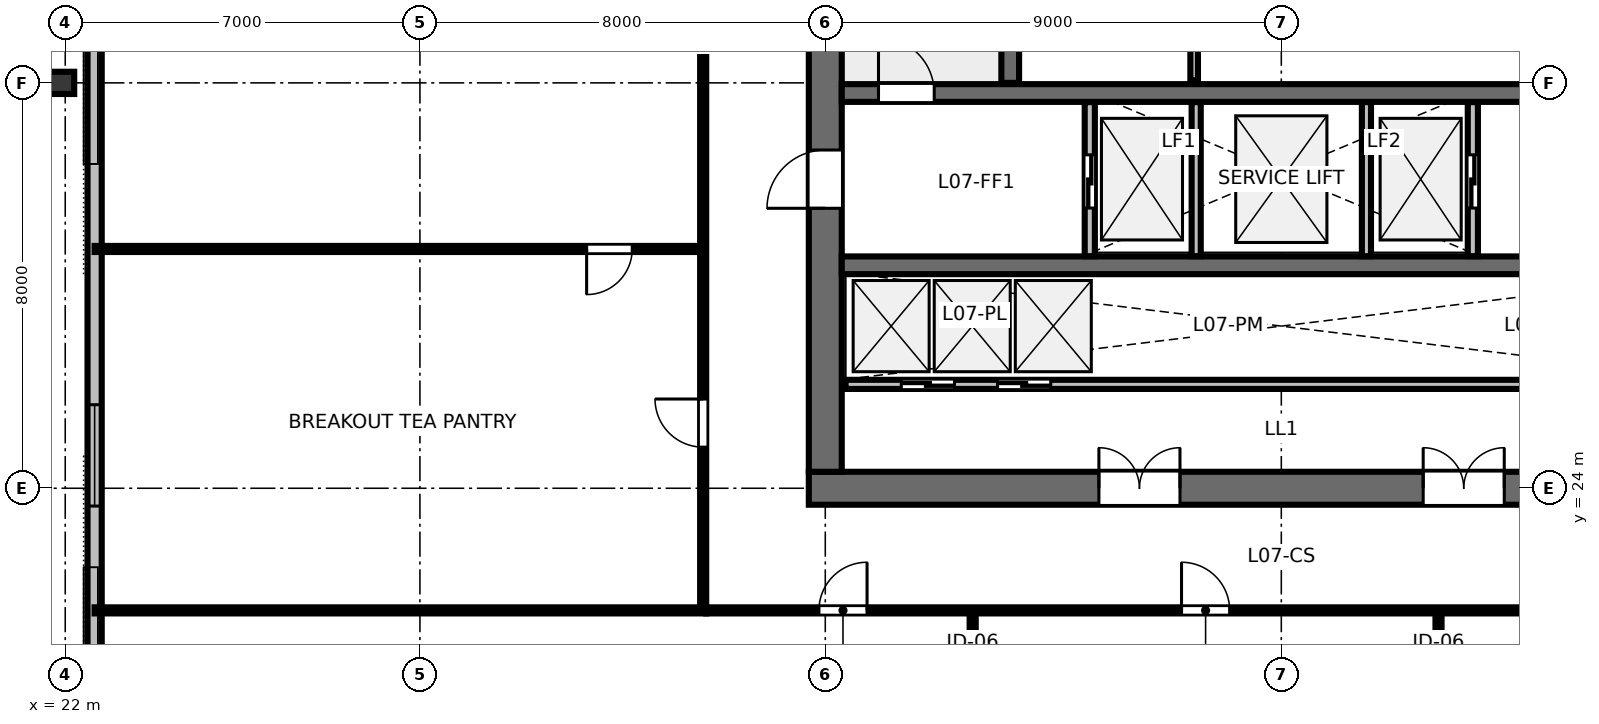
"""IFC4 building model, lengths in metres.
Left out: names, types, materials, properties, quantities, classifications, styles, units other than length and angle.
Written with IfcOpenShell. Run it as: python <this file> out.ifc"""

import sys

from ifc_helpers import new_model, si_unit, direction, frame, frame_2d, origin, origin_2d, place, context, subcontext, project, spatial, rectangle, i_section, extrude, element, fill, save


model = new_model("IFC4")
c1 = context("Model", 3, precision=1e-05, world=origin(), true_north=direction((0.0, 1.0)))
c2 = subcontext(c1, "Body", "Model", "MODEL_VIEW")
j1 = project(units=[si_unit("LENGTHUNIT", "METRE"), si_unit("PLANEANGLEUNIT", "RADIAN")], contexts=[c1])
p1 = place(None, origin())
s1 = spatial("IfcSite", under=j1, at=p1, CompositionType="ELEMENT")
p2 = place(p1, origin())
s2 = spatial("IfcBuilding", under=s1, at=p2, CompositionType="ELEMENT")
p3 = place(p2, frame((0.0, 0.0, 31.6)))
s3 = spatial("IfcBuildingStorey", under=s2, at=p3, CompositionType="ELEMENT", Elevation=31.6)
p4 = place(p3, frame((36.675, 24.0, 0.0), z_axis=(0.0, 0.0, 1.0), x_axis=(1.0, 0.0, 0.0)))
e1 = element("IfcWall", 1, at=p4, inside=s3, PredefinedType="SHEAR", context=c2, shape_type="SweptSolid", body=[
    extrude(rectangle(XDim=18.65, YDim=0.65, at=frame_2d((9.325, 0.0))), origin(), (0.0, 0.0, 1.0), 3.36),
])
p5 = place(p4, frame((5.725, 0.0, 0.0)))
e2 = element("IfcOpeningElement", 2, at=p5, cuts=e1, PredefinedType="OPENING", context=c2, shape_type="SweptSolid", body=[
    extrude(rectangle(XDim=1.6, YDim=2.15, at=frame_2d((0.8, 1.075))), frame((0.0, 0.335, 0.0), z_axis=(0.0, -1.0, 0.0), x_axis=(1.0, 0.0, 0.0)), (0.0, 0.0, 1.0), 0.67),
])
p6 = place(p4, frame((12.125, 0.0, 0.0)))
e3 = element("IfcOpeningElement", 3, at=p6, cuts=e1, PredefinedType="OPENING", context=c2, shape_type="SweptSolid", body=[
    extrude(rectangle(XDim=1.6, YDim=2.15, at=frame_2d((0.8, 1.075))), frame((0.0, 0.335, 0.0), z_axis=(0.0, -1.0, 0.0), x_axis=(1.0, 0.0, 0.0)), (0.0, 0.0, 1.0), 0.67),
])
p7 = place(p3, frame((37.0, 24.325, 0.0), z_axis=(0.0, 0.0, 1.0), x_axis=(0.0, 1.0, 0.0)))
e4 = element("IfcWall", 4, at=p7, inside=s3, PredefinedType="SHEAR", context=c2, shape_type="SweptSolid", body=[
    extrude(rectangle(XDim=15.35, YDim=0.65, at=frame_2d((7.675, 0.0))), origin(), (0.0, 0.0, 1.0), 3.36),
])
p8 = place(p7, frame((5.2, 0.0, 0.0)))
e5 = element("IfcOpeningElement", 5, at=p8, cuts=e4, PredefinedType="OPENING", context=c2, shape_type="SweptSolid", body=[
    extrude(rectangle(XDim=1.15, YDim=2.15, at=frame_2d((0.575, 1.075))), frame((0.0, 0.335, 0.0), z_axis=(0.0, -1.0, 0.0), x_axis=(1.0, 0.0, 0.0)), (0.0, 0.0, 1.0), 0.67),
])
p9 = place(p3, frame((37.325, 31.8, 0.0), z_axis=(0.0, 0.0, 1.0), x_axis=(1.0, 0.0, 0.0)))
e6 = element("IfcWall", 6, at=p9, inside=s3, PredefinedType="SHEAR", context=c2, shape_type="SweptSolid", body=[
    extrude(rectangle(XDim=17.35, YDim=0.35, at=frame_2d((8.675, 0.0))), origin(), (0.0, 0.0, 1.0), 3.36),
])
p10 = place(p9, frame((0.725, 0.0, 0.0)))
e7 = element("IfcOpeningElement", 7, at=p10, cuts=e6, PredefinedType="OPENING", context=c2, shape_type="SweptSolid", body=[
    extrude(rectangle(XDim=1.1, YDim=2.15, at=frame_2d((0.55, 1.075))), frame((0.0, 0.185, 0.0), z_axis=(0.0, -1.0, 0.0), x_axis=(1.0, 0.0, 0.0)), (0.0, 0.0, 1.0), 0.37),
])
p11 = place(p9, frame((14.625, 0.0, 0.0)))
e8 = element("IfcOpeningElement", 8, at=p11, cuts=e6, PredefinedType="OPENING", context=c2, shape_type="SweptSolid", body=[
    extrude(rectangle(XDim=1.1, YDim=2.15, at=frame_2d((0.55, 1.075))), frame((0.0, 0.185, 0.0), z_axis=(0.0, -1.0, 0.0), x_axis=(1.0, 0.0, 0.0)), (0.0, 0.0, 1.0), 0.37),
])
p12 = place(p3, frame((37.325, 28.4, 0.0), z_axis=(0.0, 0.0, 1.0), x_axis=(1.0, 0.0, 0.0)))
e9 = element("IfcWall", 9, at=p12, inside=s3, PredefinedType="SHEAR", context=c2, shape_type="SweptSolid", body=[
    extrude(rectangle(XDim=17.35, YDim=0.35, at=frame_2d((8.675, 0.0))), origin(), (0.0, 0.0, 1.0), 3.36),
])
p13 = place(p3, frame((21.92, 32.0, 0.0), z_axis=(0.0, 0.0, 1.0), x_axis=(0.0, 1.0, 0.0)))
e10 = element("IfcColumn", 10, at=p13, inside=s3, PredefinedType="COLUMN", context=c2, shape_type="SweptSolid", body=[
    extrude(i_section(OverallWidth=0.439, OverallDepth=0.514, WebThickness=0.06, FlangeThickness=0.097, FilletRadius=0.025, at=origin_2d()), origin(), (0.0, 0.0, 1.0), 3.148),
])
p14 = place(p3, frame((22.58, 49.64, 0.0), z_axis=(0.0, 0.0, 1.0), x_axis=(0.0, -1.0, 0.0)))
e11 = element("IfcWall", 11, at=p14, inside=s3, PredefinedType="STANDARD", context=c2, shape_type="SweptSolid", body=[
    extrude(rectangle(XDim=35.28, YDim=0.28, at=frame_2d((17.64, 0.0))), origin(), (0.0, 0.0, 1.0), 3.15),
])
p15 = place(p14, frame((1.938, 0.0, 0.8)))
e12 = element("IfcOpeningElement", 12, at=p15, cuts=e11, PredefinedType="OPENING", context=c2, shape_type="SweptSolid", body=[
    extrude(rectangle(XDim=2.0, YDim=1.95, at=frame_2d((1.0, 0.975))), frame((0.0, 0.15, 0.0), z_axis=(0.0, -1.0, 0.0), x_axis=(1.0, 0.0, 0.0)), (0.0, 0.0, 1.0), 0.3),
])
p16 = place(p14, frame((9.289, 0.0, 0.8)))
e13 = element("IfcOpeningElement", 13, at=p16, cuts=e11, PredefinedType="OPENING", context=c2, shape_type="SweptSolid", body=[
    extrude(rectangle(XDim=2.0, YDim=1.95, at=frame_2d((1.0, 0.975))), frame((0.0, 0.15, 0.0), z_axis=(0.0, -1.0, 0.0), x_axis=(1.0, 0.0, 0.0)), (0.0, 0.0, 1.0), 0.3),
])
p17 = place(p14, frame((12.964, 0.0, 0.8)))
e14 = element("IfcOpeningElement", 14, at=p17, cuts=e11, PredefinedType="OPENING", context=c2, shape_type="SweptSolid", body=[
    extrude(rectangle(XDim=2.0, YDim=1.95, at=frame_2d((1.0, 0.975))), frame((0.0, 0.15, 0.0), z_axis=(0.0, -1.0, 0.0), x_axis=(1.0, 0.0, 0.0)), (0.0, 0.0, 1.0), 0.3),
])
p18 = place(p14, frame((23.991, 0.0, 0.8)))
e15 = element("IfcOpeningElement", 15, at=p18, cuts=e11, PredefinedType="OPENING", context=c2, shape_type="SweptSolid", body=[
    extrude(rectangle(XDim=2.0, YDim=1.95, at=frame_2d((1.0, 0.975))), frame((0.0, 0.15, 0.0), z_axis=(0.0, -1.0, 0.0), x_axis=(1.0, 0.0, 0.0)), (0.0, 0.0, 1.0), 0.3),
])
p19 = place(p14, frame((31.342, 0.0, 0.8)))
e16 = element("IfcOpeningElement", 16, at=p19, cuts=e11, PredefinedType="OPENING", context=c2, shape_type="SweptSolid", body=[
    extrude(rectangle(XDim=2.0, YDim=1.95, at=frame_2d((1.0, 0.975))), frame((0.0, 0.15, 0.0), z_axis=(0.0, -1.0, 0.0), x_axis=(1.0, 0.0, 0.0)), (0.0, 0.0, 1.0), 0.3),
])
p20 = place(p3, frame((40.65, 32.0, 0.0), z_axis=(0.0, 0.0, 1.0), x_axis=(0.0, 1.0, 0.0)))
e17 = element("IfcWall", 17, at=p20, inside=s3, PredefinedType="SHEAR", context=c2, shape_type="SweptSolid", body=[
    extrude(rectangle(XDim=7.7, YDim=0.35, at=frame_2d((3.85, 0.0))), origin(), (0.0, 0.0, 1.0), 3.6),
])
p21 = place(p3, frame((44.28, 32.05, 0.0), z_axis=(0.0, 0.0, 1.0), x_axis=(0.0, 1.0, 0.0)))
e18 = element("IfcWall", 18, at=p21, inside=s3, PredefinedType="PARTITIONING", context=c2, shape_type="SweptSolid", body=[
    extrude(rectangle(XDim=3.67, YDim=0.15, at=frame_2d((1.835, 0.0))), origin(), (0.0, 0.0, 1.0), 3.15),
])
p22 = place(p21, frame((1.35, 0.0, 0.0)))
e19 = element("IfcOpeningElement", 19, at=p22, cuts=e18, PredefinedType="OPENING", context=c2, shape_type="SweptSolid", body=[
    extrude(rectangle(XDim=0.92, YDim=2.15, at=frame_2d((0.46, 1.075))), frame((0.0, 0.085, 0.0), z_axis=(0.0, -1.0, 0.0), x_axis=(1.0, 0.0, 0.0)), (0.0, 0.0, 1.0), 0.17),
])
p23 = place(p3, frame((42.22, 28.58, 0.0), z_axis=(0.0, 0.0, 1.0), x_axis=(0.0, 1.0, 0.0)))
e20 = element("IfcWall", 20, at=p23, inside=s3, PredefinedType="PARTITIONING", context=c2, shape_type="SweptSolid", body=[
    extrude(rectangle(XDim=3.04, YDim=0.2, at=frame_2d((1.52, 0.0))), origin(), (0.0, 0.0, 1.0), 3.15),
])
p24 = place(p23, frame((0.95, 0.0, 0.0)))
e21 = element("IfcOpeningElement", 21, at=p24, cuts=e20, PredefinedType="OPENING", context=c2, shape_type="SweptSolid", body=[
    extrude(rectangle(XDim=1.05, YDim=2.15, at=frame_2d((0.525, 1.075))), frame((0.0, 0.11, 0.0), z_axis=(0.0, -1.0, 0.0), x_axis=(1.0, 0.0, 0.0)), (0.0, 0.0, 1.0), 0.22),
])
p25 = place(p3, frame((49.78, 28.58, 0.0), z_axis=(0.0, 0.0, 1.0), x_axis=(0.0, 1.0, 0.0)))
e22 = element("IfcWall", 22, at=p25, inside=s3, PredefinedType="PARTITIONING", context=c2, shape_type="SweptSolid", body=[
    extrude(rectangle(XDim=3.04, YDim=0.2, at=frame_2d((1.52, 0.0))), origin(), (0.0, 0.0, 1.0), 3.15),
])
p26 = place(p25, frame((0.95, 0.0, 0.0)))
e23 = element("IfcOpeningElement", 23, at=p26, cuts=e22, PredefinedType="OPENING", context=c2, shape_type="SweptSolid", body=[
    extrude(rectangle(XDim=1.05, YDim=2.15, at=frame_2d((0.525, 1.075))), frame((0.0, 0.11, 0.0), z_axis=(0.0, -1.0, 0.0), x_axis=(1.0, 0.0, 0.0)), (0.0, 0.0, 1.0), 0.22),
])
for number, where, z_axis, x_axis in (
    (24, (44.32, 28.58, 0.0), (0.0, 0.0, 1.0), (0.0, 1.0, 0.0)),
    (25, (47.68, 28.58, 0.0), (0.0, 0.0, 1.0), (0.0, 1.0, 0.0)),
):
    element("IfcWall", number, at=place(p3, frame(where, z_axis=z_axis, x_axis=x_axis)), inside=s3, PredefinedType="PARTITIONING", context=c2, shape_type="SweptSolid", body=[
        extrude(rectangle(XDim=3.04, YDim=0.18, at=frame_2d((1.52, 0.0))), origin(), (0.0, 0.0, 1.0), 3.15),
    ])
p27 = place(p3, frame((37.4, 26.05, 0.0), z_axis=(0.0, 0.0, 1.0), x_axis=(1.0, 0.0, 0.0)))
e26 = element("IfcWall", 26, at=p27, inside=s3, PredefinedType="PARTITIONING", context=c2, shape_type="SweptSolid", body=[
    extrude(rectangle(XDim=17.2, YDim=0.18, at=frame_2d((8.6, 0.0))), origin(), (0.0, 0.0, 1.0), 3.15),
])
p28 = place(p27, frame((1.1, 0.0, 0.0)))
e27 = element("IfcOpeningElement", 27, at=p28, cuts=e26, PredefinedType="OPENING", context=c2, shape_type="SweptSolid", body=[
    extrude(rectangle(XDim=1.05, YDim=2.15, at=frame_2d((0.525, 1.075))), frame((0.0, 0.1, 0.0), z_axis=(0.0, -1.0, 0.0), x_axis=(1.0, 0.0, 0.0)), (0.0, 0.0, 1.0), 0.2),
])
p29 = place(p27, frame((3.0, 0.0, 0.0)))
e28 = element("IfcOpeningElement", 28, at=p29, cuts=e26, PredefinedType="OPENING", context=c2, shape_type="SweptSolid", body=[
    extrude(rectangle(XDim=1.05, YDim=2.15, at=frame_2d((0.525, 1.075))), frame((0.0, 0.1, 0.0), z_axis=(0.0, -1.0, 0.0), x_axis=(1.0, 0.0, 0.0)), (0.0, 0.0, 1.0), 0.2),
])
p30 = place(p3, frame((39.909, 21.59, 0.0), z_axis=(0.0, 0.0, 1.0), x_axis=(0.0, -1.0, 0.0)))
e29 = element("IfcWall", 29, at=p30, inside=s3, PredefinedType="PARTITIONING", context=c2, shape_type="SweptSolid", body=[
    extrude(rectangle(XDim=10.21, YDim=0.12, at=frame_2d((5.105, 0.0))), origin(), (0.0, 0.0, 1.0), 2.43),
])
p31 = place(p30, frame((1.4, 0.0, 0.0)))
e30 = element("IfcOpeningElement", 30, at=p31, cuts=e29, PredefinedType="OPENING", context=c2, shape_type="SweptSolid", body=[
    extrude(rectangle(XDim=0.9, YDim=2.15, at=frame_2d((0.45, 1.075))), frame((0.0, 0.07, 0.0), z_axis=(0.0, -1.0, 0.0), x_axis=(1.0, 0.0, 0.0)), (0.0, 0.0, 1.0), 0.14),
])
p32 = place(p3, frame((49.102, 21.59, 0.0), z_axis=(0.0, 0.0, 1.0), x_axis=(0.0, -1.0, 0.0)))
e31 = element("IfcWall", 31, at=p32, inside=s3, PredefinedType="PARTITIONING", context=c2, shape_type="SweptSolid", body=[
    extrude(rectangle(XDim=10.21, YDim=0.12, at=frame_2d((5.105, 0.0))), origin(), (0.0, 0.0, 1.0), 2.43),
])
p33 = place(p32, frame((1.4, 0.0, 0.0)))
e32 = element("IfcOpeningElement", 32, at=p33, cuts=e31, PredefinedType="OPENING", context=c2, shape_type="SweptSolid", body=[
    extrude(rectangle(XDim=0.9, YDim=2.15, at=frame_2d((0.45, 1.075))), frame((0.0, 0.07, 0.0), z_axis=(0.0, -1.0, 0.0), x_axis=(1.0, 0.0, 0.0)), (0.0, 0.0, 1.0), 0.14),
])
p34 = place(p3, frame((34.65, 21.59, 0.0), z_axis=(0.0, 0.0, 1.0), x_axis=(1.0, 0.0, 0.0)))
e33 = element("IfcWall", 33, at=p34, inside=s3, PredefinedType="PARTITIONING", context=c2, shape_type="SweptSolid", body=[
    extrude(rectangle(XDim=22.7, YDim=0.12, at=frame_2d((11.35, 0.0))), origin(), (0.0, 0.0, 1.0), 2.43),
])
p35 = place(p34, frame((2.224, 0.0, 0.0)))
e34 = element("IfcOpeningElement", 34, at=p35, cuts=e33, PredefinedType="OPENING", context=c2, shape_type="SweptSolid", body=[
    extrude(rectangle(XDim=0.95, YDim=2.15, at=frame_2d((0.475, 1.075))), frame((0.0, 0.07, 0.0), z_axis=(0.0, -1.0, 0.0), x_axis=(1.0, 0.0, 0.0)), (0.0, 0.0, 1.0), 0.14),
])
p36 = place(p34, frame((9.381, 0.0, 0.0)))
e35 = element("IfcOpeningElement", 35, at=p36, cuts=e33, PredefinedType="OPENING", context=c2, shape_type="SweptSolid", body=[
    extrude(rectangle(XDim=0.95, YDim=2.15, at=frame_2d((0.475, 1.075))), frame((0.0, 0.07, 0.0), z_axis=(0.0, -1.0, 0.0), x_axis=(1.0, 0.0, 0.0)), (0.0, 0.0, 1.0), 0.14),
])
p37 = place(p34, frame((18.031, 0.0, 0.0)))
e36 = element("IfcOpeningElement", 36, at=p37, cuts=e33, PredefinedType="OPENING", context=c2, shape_type="SweptSolid", body=[
    extrude(rectangle(XDim=0.95, YDim=2.15, at=frame_2d((0.475, 1.075))), frame((0.0, 0.07, 0.0), z_axis=(0.0, -1.0, 0.0), x_axis=(1.0, 0.0, 0.0)), (0.0, 0.0, 1.0), 0.14),
])
p38 = place(p3, frame((34.59, 28.722, 0.0), z_axis=(0.0, 0.0, 1.0), x_axis=(-1.0, 0.0, 0.0)))
e37 = element("IfcWall", 37, at=p38, inside=s3, PredefinedType="PARTITIONING", context=c2, shape_type="SweptSolid", body=[
    extrude(rectangle(XDim=12.01, YDim=0.12, at=frame_2d((6.005, 0.0))), origin(), (0.0, 0.0, 1.0), 2.43),
])
p39 = place(p38, frame((1.4, 0.0, 0.0)))
e38 = element("IfcOpeningElement", 38, at=p39, cuts=e37, PredefinedType="OPENING", context=c2, shape_type="SweptSolid", body=[
    extrude(rectangle(XDim=0.9, YDim=2.15, at=frame_2d((0.45, 1.075))), frame((0.0, 0.07, 0.0), z_axis=(0.0, -1.0, 0.0), x_axis=(1.0, 0.0, 0.0)), (0.0, 0.0, 1.0), 0.14),
])
p40 = place(p3, frame((34.59, 21.65, 0.0), z_axis=(0.0, 0.0, 1.0), x_axis=(0.0, 1.0, 0.0)))
e39 = element("IfcWall", 39, at=p40, inside=s3, PredefinedType="PARTITIONING", context=c2, shape_type="SweptSolid", body=[
    extrude(rectangle(XDim=20.7, YDim=0.12, at=frame_2d((10.35, 0.0))), origin(), (0.0, 0.0, 1.0), 2.43),
])
p41 = place(p40, frame((3.161, 0.0, 0.0)))
e40 = element("IfcOpeningElement", 40, at=p41, cuts=e39, PredefinedType="OPENING", context=c2, shape_type="SweptSolid", body=[
    extrude(rectangle(XDim=0.95, YDim=2.15, at=frame_2d((0.475, 1.075))), frame((0.0, 0.07, 0.0), z_axis=(0.0, -1.0, 0.0), x_axis=(1.0, 0.0, 0.0)), (0.0, 0.0, 1.0), 0.14),
])
p42 = place(p40, frame((13.311, 0.0, 0.0)))
e41 = element("IfcOpeningElement", 41, at=p42, cuts=e39, PredefinedType="OPENING", context=c2, shape_type="SweptSolid", body=[
    extrude(rectangle(XDim=0.95, YDim=2.15, at=frame_2d((0.475, 1.075))), frame((0.0, 0.07, 0.0), z_axis=(0.0, -1.0, 0.0), x_axis=(1.0, 0.0, 0.0)), (0.0, 0.0, 1.0), 0.14),
])
p43 = place(p3, frame((34.65, 21.59, 0.0), z_axis=(0.0, 0.0, 1.0), x_axis=(-1.0, 0.0, 0.0)))
e42 = element("IfcWall", 42, at=p43, inside=s3, PredefinedType="PARTITIONING", context=c2, shape_type="SweptSolid", body=[
    extrude(rectangle(XDim=12.07, YDim=0.12, at=frame_2d((6.035, 0.0))), origin(), (0.0, 0.0, 1.0), 2.43),
])
p44 = place(p18, origin())
e43 = element("IfcWindow", 43, at=p44, inside=s3, PartitioningType="SINGLE_PANEL", PredefinedType="WINDOW", context=c2, shape_type="SweptSolid", body=[
    extrude(rectangle(XDim=2.0, YDim=1.95, at=frame_2d((1.0, 0.975))), frame((0.0, 0.03, 0.0), z_axis=(0.0, -1.0, 0.0), x_axis=(1.0, 0.0, 0.0)), (0.0, 0.0, 1.0), 0.06),
])
fill(e15, e43)
p45 = place(p10, origin())
e44 = element("IfcDoor", 44, at=p45, inside=s3, OperationType="SINGLE_SWING_LEFT", PredefinedType="DOOR", context=c2, shape_type="SweptSolid", body=[
    extrude(rectangle(XDim=1.1, YDim=2.15, at=frame_2d((0.55, 1.075))), frame((0.0, 0.025, 0.0), z_axis=(0.0, -1.0, 0.0), x_axis=(1.0, 0.0, 0.0)), (0.0, 0.0, 1.0), 0.05),
])
fill(e7, e44)
p46 = place(p8, origin())
e45 = element("IfcDoor", 45, at=p46, inside=s3, OperationType="SINGLE_SWING_LEFT", PredefinedType="DOOR", context=c2, shape_type="SweptSolid", body=[
    extrude(rectangle(XDim=1.15, YDim=2.15, at=frame_2d((0.575, 1.075))), frame((0.0, 0.025, 0.0), z_axis=(0.0, -1.0, 0.0), x_axis=(1.0, 0.0, 0.0)), (0.0, 0.0, 1.0), 0.05),
])
fill(e5, e45)
p47 = place(p5, origin())
e46 = element("IfcDoor", 46, at=p47, inside=s3, OperationType="DOUBLE_DOOR_SINGLE_SWING", PredefinedType="DOOR", context=c2, shape_type="SweptSolid", body=[
    extrude(rectangle(XDim=1.6, YDim=2.15, at=frame_2d((0.8, 1.075))), frame((0.0, 0.025, 0.0), z_axis=(0.0, -1.0, 0.0), x_axis=(1.0, 0.0, 0.0)), (0.0, 0.0, 1.0), 0.05),
])
fill(e2, e46)
p48 = place(p6, origin())
e47 = element("IfcDoor", 47, at=p48, inside=s3, OperationType="DOUBLE_DOOR_SINGLE_SWING", PredefinedType="DOOR", context=c2, shape_type="SweptSolid", body=[
    extrude(rectangle(XDim=1.6, YDim=2.15, at=frame_2d((0.8, 1.075))), frame((0.0, 0.025, 0.0), z_axis=(0.0, -1.0, 0.0), x_axis=(1.0, 0.0, 0.0)), (0.0, 0.0, 1.0), 0.05),
])
fill(e3, e47)
p49 = place(p24, origin())
e48 = element("IfcDoor", 48, at=p49, inside=s3, OperationType="SLIDING_TO_LEFT", PredefinedType="DOOR", context=c2, shape_type="SweptSolid", body=[
    extrude(rectangle(XDim=1.05, YDim=2.15, at=frame_2d((0.525, 1.075))), frame((0.0, 0.025, 0.0), z_axis=(0.0, -1.0, 0.0), x_axis=(1.0, 0.0, 0.0)), (0.0, 0.0, 1.0), 0.05),
])
fill(e21, e48)
p50 = place(p26, origin())
e49 = element("IfcDoor", 49, at=p50, inside=s3, OperationType="SLIDING_TO_RIGHT", PredefinedType="DOOR", context=c2, shape_type="SweptSolid", body=[
    extrude(rectangle(XDim=1.05, YDim=2.15, at=frame_2d((0.525, 1.075))), frame((0.0, 0.025, 0.0), z_axis=(0.0, -1.0, 0.0), x_axis=(1.0, 0.0, 0.0)), (0.0, 0.0, 1.0), 0.05),
])
fill(e23, e49)
p51 = place(p28, origin())
e50 = element("IfcDoor", 50, at=p51, inside=s3, OperationType="SLIDING_TO_LEFT", PredefinedType="DOOR", context=c2, shape_type="SweptSolid", body=[
    extrude(rectangle(XDim=1.05, YDim=2.15, at=frame_2d((0.525, 1.075))), frame((0.0, 0.025, 0.0), z_axis=(0.0, -1.0, 0.0), x_axis=(1.0, 0.0, 0.0)), (0.0, 0.0, 1.0), 0.05),
])
fill(e27, e50)
p52 = place(p29, origin())
e51 = element("IfcDoor", 51, at=p52, inside=s3, OperationType="SLIDING_TO_RIGHT", PredefinedType="DOOR", context=c2, shape_type="SweptSolid", body=[
    extrude(rectangle(XDim=1.05, YDim=2.15, at=frame_2d((0.525, 1.075))), frame((0.0, 0.025, 0.0), z_axis=(0.0, -1.0, 0.0), x_axis=(1.0, 0.0, 0.0)), (0.0, 0.0, 1.0), 0.05),
])
fill(e28, e51)
p53 = place(p35, origin())
e52 = element("IfcDoor", 52, at=p53, inside=s3, OperationType="SINGLE_SWING_RIGHT", PredefinedType="DOOR", context=c2, shape_type="SweptSolid", body=[
    extrude(rectangle(XDim=0.95, YDim=2.15, at=frame_2d((0.475, 1.075))), frame((0.0, 0.025, 0.0), z_axis=(0.0, -1.0, 0.0), x_axis=(1.0, 0.0, 0.0)), (0.0, 0.0, 1.0), 0.05),
])
fill(e34, e52)
p54 = place(p36, origin())
e53 = element("IfcDoor", 53, at=p54, inside=s3, OperationType="SINGLE_SWING_LEFT", PredefinedType="DOOR", context=c2, shape_type="SweptSolid", body=[
    extrude(rectangle(XDim=0.95, YDim=2.15, at=frame_2d((0.475, 1.075))), frame((0.0, 0.025, 0.0), z_axis=(0.0, -1.0, 0.0), x_axis=(1.0, 0.0, 0.0)), (0.0, 0.0, 1.0), 0.05),
])
fill(e35, e53)
p55 = place(p39, origin())
e54 = element("IfcDoor", 54, at=p55, inside=s3, OperationType="SINGLE_SWING_RIGHT", PredefinedType="DOOR", context=c2, shape_type="SweptSolid", body=[
    extrude(rectangle(XDim=0.9, YDim=2.15, at=frame_2d((0.45, 1.075))), frame((0.0, 0.025, 0.0), z_axis=(0.0, -1.0, 0.0), x_axis=(1.0, 0.0, 0.0)), (0.0, 0.0, 1.0), 0.05),
])
fill(e38, e54)
p56 = place(p41, origin())
e55 = element("IfcDoor", 55, at=p56, inside=s3, OperationType="SINGLE_SWING_RIGHT", PredefinedType="DOOR", context=c2, shape_type="SweptSolid", body=[
    extrude(rectangle(XDim=0.95, YDim=2.15, at=frame_2d((0.475, 1.075))), frame((0.0, 0.025, 0.0), z_axis=(0.0, -1.0, 0.0), x_axis=(1.0, 0.0, 0.0)), (0.0, 0.0, 1.0), 0.05),
])
fill(e40, e55)
save(model, sys.argv[1])
